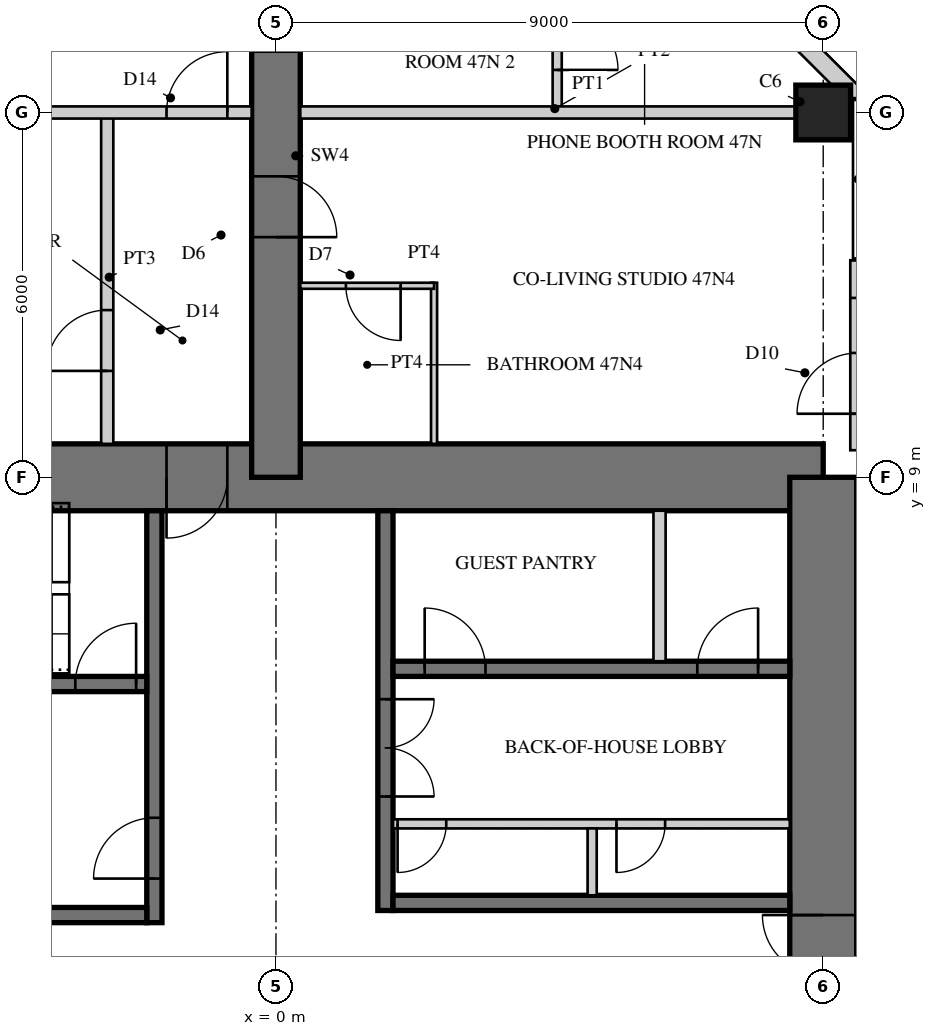
"""IFC4 building model, lengths in metres.
Left out: names, types, materials, properties, quantities, classifications, styles, units other than length and angle.
Written with IfcOpenShell. Run it as: python <this file> out.ifc"""

import sys

from ifc_helpers import new_model, si_unit, direction, frame, frame_2d, origin, origin_2d, place, context, subcontext, project, spatial, rectangle, hollow_rectangle, extrude, element, fill, save


model = new_model("IFC4")
c1 = context("Model", 3, precision=1e-05, world=origin(), true_north=direction((0.0, 1.0)))
c2 = subcontext(c1, "Body", "Model", "MODEL_VIEW")
j1 = project(units=[si_unit("LENGTHUNIT", "METRE"), si_unit("PLANEANGLEUNIT", "RADIAN")], contexts=[c1])
p1 = place(None, origin())
s1 = spatial("IfcSite", under=j1, at=p1, CompositionType="ELEMENT")
p2 = place(p1, origin())
s2 = spatial("IfcBuilding", under=s1, at=p2, CompositionType="ELEMENT")
p3 = place(p2, frame((0.0, 0.0, 189.9)))
s3 = spatial("IfcBuildingStorey", under=s2, at=p3, CompositionType="ELEMENT", Elevation=189.9)
p4 = place(p3, frame((9.0, 9.0, 0.0), z_axis=(0.0, 0.0, 1.0), x_axis=(-1.0, 0.0, 0.0)))
e1 = element("IfcWall", 1, at=p4, inside=s3, PredefinedType="SHEAR", context=c2, shape_type="SweptSolid", body=[
    extrude(rectangle(XDim=18.0, YDim=1.1, at=frame_2d((9.0, 0.0))), origin(), (0.0, 0.0, 1.0), 3.4),
])
p5 = place(p4, frame((9.8, 0.0, 0.0)))
e2 = element("IfcOpeningElement", 2, at=p5, cuts=e1, PredefinedType="OPENING", context=c2, shape_type="SweptSolid", body=[
    extrude(rectangle(XDim=1.0, YDim=2.4, at=frame_2d((0.5, 1.2))), frame((0.0, 0.56, 0.0), z_axis=(0.0, -1.0, 0.0), x_axis=(1.0, 0.0, 0.0)), (0.0, 0.0, 1.0), 1.12),
])
p6 = place(p3, frame((9.0, -9.0, 0.0), z_axis=(0.0, 0.0, 1.0), x_axis=(0.0, 1.0, 0.0)))
e3 = element("IfcWall", 3, at=p6, inside=s3, PredefinedType="SHEAR", context=c2, shape_type="SweptSolid", body=[
    extrude(rectangle(XDim=18.0, YDim=1.1, at=frame_2d((9.0, 0.0))), origin(), (0.0, 0.0, 1.0), 3.4),
])
p7 = place(p6, frame((9.8, 0.0, 0.0)))
e4 = element("IfcOpeningElement", 4, at=p7, cuts=e3, PredefinedType="OPENING", context=c2, shape_type="SweptSolid", body=[
    extrude(rectangle(XDim=1.0, YDim=2.4, at=frame_2d((0.5, 1.2))), frame((0.0, 0.56, 0.0), z_axis=(0.0, -1.0, 0.0), x_axis=(1.0, 0.0, 0.0)), (0.0, 0.0, 1.0), 1.12),
])
p8 = place(p3, frame((1.8, 1.875, 0.0), z_axis=(0.0, 0.0, 1.0), x_axis=(0.0, 1.0, 0.0)))
e5 = element("IfcWall", 5, at=p8, inside=s3, PredefinedType="SHEAR", context=c2, shape_type="SweptSolid", body=[
    extrude(rectangle(XDim=6.575, YDim=0.25, at=frame_2d((3.288, 0.0))), origin(), (0.0, 0.0, 1.0), 3.4),
])
p9 = place(p8, frame((1.875, 0.0, 0.0)))
e6 = element("IfcOpeningElement", 6, at=p9, cuts=e5, PredefinedType="OPENING", context=c2, shape_type="SweptSolid", body=[
    extrude(rectangle(XDim=1.6, YDim=2.4, at=frame_2d((0.8, 1.2))), frame((0.0, 0.135, 0.0), z_axis=(0.0, -1.0, 0.0), x_axis=(1.0, 0.0, 0.0)), (0.0, 0.0, 1.0), 0.27),
])
p10 = place(p3, frame((1.925, 2.0, 0.0), z_axis=(0.0, 0.0, 1.0), x_axis=(1.0, 0.0, 0.0)))
e7 = element("IfcWall", 7, at=p10, inside=s3, PredefinedType="SHEAR", context=c2, shape_type="SweptSolid", body=[
    extrude(rectangle(XDim=6.525, YDim=0.25, at=frame_2d((3.262, 0.0))), origin(), (0.0, 0.0, 1.0), 3.4),
])
p11 = place(p3, frame((1.925, 5.85, 0.0), z_axis=(0.0, 0.0, 1.0), x_axis=(1.0, 0.0, 0.0)))
e8 = element("IfcWall", 8, at=p11, inside=s3, PredefinedType="SHEAR", context=c2, shape_type="SweptSolid", body=[
    extrude(rectangle(XDim=6.525, YDim=0.25, at=frame_2d((3.262, 0.0))), origin(), (0.0, 0.0, 1.0), 3.4),
])
p12 = place(p11, frame((0.521, 0.0, 0.0)))
e9 = element("IfcOpeningElement", 9, at=p12, cuts=e8, PredefinedType="OPENING", context=c2, shape_type="SweptSolid", body=[
    extrude(rectangle(XDim=1.0, YDim=2.1, at=frame_2d((0.5, 1.05))), frame((0.0, 0.135, 0.0), z_axis=(0.0, -1.0, 0.0), x_axis=(1.0, 0.0, 0.0)), (0.0, 0.0, 1.0), 0.27),
])
p13 = place(p11, frame((5.004, 0.0, 0.0)))
e10 = element("IfcOpeningElement", 10, at=p13, cuts=e8, PredefinedType="OPENING", context=c2, shape_type="SweptSolid", body=[
    extrude(rectangle(XDim=1.0, YDim=2.1, at=frame_2d((0.5, 1.05))), frame((0.0, 0.135, 0.0), z_axis=(0.0, -1.0, 0.0), x_axis=(1.0, 0.0, 0.0)), (0.0, 0.0, 1.0), 0.27),
])
p14 = place(p3, frame((1.925, 3.3, 0.0), z_axis=(0.0, 0.0, 1.0), x_axis=(1.0, 0.0, 0.0)))
e11 = element("IfcWall", 11, at=p14, inside=s3, PredefinedType="PARTITIONING", context=c2, shape_type="SweptSolid", body=[
    extrude(rectangle(XDim=6.525, YDim=0.15, at=frame_2d((3.262, 0.0))), origin(), (0.0, 0.0, 1.0), 3.4),
])
p15 = place(p14, frame((0.075, 0.0, 0.0)))
e12 = element("IfcOpeningElement", 12, at=p15, cuts=e11, PredefinedType="OPENING", context=c2, shape_type="SweptSolid", body=[
    extrude(rectangle(XDim=0.8, YDim=2.1, at=frame_2d((0.4, 1.05))), frame((0.0, 0.085, 0.0), z_axis=(0.0, -1.0, 0.0), x_axis=(1.0, 0.0, 0.0)), (0.0, 0.0, 1.0), 0.17),
])
p16 = place(p14, frame((3.675, 0.0, 0.0)))
e13 = element("IfcOpeningElement", 13, at=p16, cuts=e11, PredefinedType="OPENING", context=c2, shape_type="SweptSolid", body=[
    extrude(rectangle(XDim=0.8, YDim=2.1, at=frame_2d((0.4, 1.05))), frame((0.0, 0.085, 0.0), z_axis=(0.0, -1.0, 0.0), x_axis=(1.0, 0.0, 0.0)), (0.0, 0.0, 1.0), 0.17),
])
p17 = place(p3, frame((5.2, 2.125, 0.0), z_axis=(0.0, 0.0, 1.0), x_axis=(0.0, 1.0, 0.0)))
e14 = element("IfcWall", 14, at=p17, inside=s3, PredefinedType="PARTITIONING", context=c2, shape_type="SweptSolid", body=[
    extrude(rectangle(XDim=1.1, YDim=0.15, at=frame_2d((0.55, 0.0))), origin(), (0.0, 0.0, 1.0), 3.4),
])
p18 = place(p3, frame((6.308, 5.975, 0.0), z_axis=(0.0, 0.0, 1.0), x_axis=(0.0, 1.0, 0.0)))
e15 = element("IfcWall", 15, at=p18, inside=s3, PredefinedType="PARTITIONING", context=c2, shape_type="SweptSolid", body=[
    extrude(rectangle(XDim=2.475, YDim=0.2, at=frame_2d((1.237, 0.0))), origin(), (0.0, 0.0, 1.0), 3.4),
])
p19 = place(p3, frame((-2.0, 1.675, 0.0), z_axis=(0.0, 0.0, 1.0), x_axis=(0.0, 1.0, 0.0)))
e16 = element("IfcWall", 16, at=p19, inside=s3, PredefinedType="SHEAR", context=c2, shape_type="SweptSolid", body=[
    extrude(rectangle(XDim=6.775, YDim=0.25, at=frame_2d((3.387, 0.0))), origin(), (0.0, 0.0, 1.0), 3.4),
])
p20 = place(p19, frame((0.725, 0.0, 0.0)))
e17 = element("IfcOpeningElement", 17, at=p20, cuts=e16, PredefinedType="OPENING", context=c2, shape_type="SweptSolid", body=[
    extrude(rectangle(XDim=1.0, YDim=2.1, at=frame_2d((0.5, 1.05))), frame((0.0, 0.135, 0.0), z_axis=(0.0, -1.0, 0.0), x_axis=(1.0, 0.0, 0.0)), (0.0, 0.0, 1.0), 0.27),
])
p21 = place(p3, frame((-2.125, 1.8, 0.0), z_axis=(0.0, 0.0, 1.0), x_axis=(-1.0, 0.0, 0.0)))
e18 = element("IfcWall", 18, at=p21, inside=s3, PredefinedType="SHEAR", context=c2, shape_type="SweptSolid", body=[
    extrude(rectangle(XDim=6.325, YDim=0.25, at=frame_2d((3.163, 0.0))), origin(), (0.0, 0.0, 1.0), 3.4),
])
p22 = place(p3, frame((-2.125, 5.6, 0.0), z_axis=(0.0, 0.0, 1.0), x_axis=(-1.0, 0.0, 0.0)))
e19 = element("IfcWall", 19, at=p22, inside=s3, PredefinedType="SHEAR", context=c2, shape_type="SweptSolid", body=[
    extrude(rectangle(XDim=6.325, YDim=0.25, at=frame_2d((3.163, 0.0))), origin(), (0.0, 0.0, 1.0), 3.4),
])
p23 = place(p22, frame((0.175, 0.0, 0.0)))
e20 = element("IfcOpeningElement", 20, at=p23, cuts=e19, PredefinedType="OPENING", context=c2, shape_type="SweptSolid", body=[
    extrude(rectangle(XDim=1.0, YDim=2.1, at=frame_2d((0.5, 1.05))), frame((0.0, 0.135, 0.0), z_axis=(0.0, -1.0, 0.0), x_axis=(1.0, 0.0, 0.0)), (0.0, 0.0, 1.0), 0.27),
])
p24 = place(p3, frame((0.0, 9.0, 0.0), z_axis=(0.0, 0.0, 1.0), x_axis=(0.0, 1.0, 0.0)))
e21 = element("IfcWall", 21, at=p24, inside=s3, PredefinedType="SHEAR", context=c2, shape_type="SweptSolid", body=[
    extrude(rectangle(XDim=9.0, YDim=0.8, at=frame_2d((4.5, 0.0))), origin(), (0.0, 0.0, 1.0), 3.4),
])
p25 = place(p24, frame((3.95, 0.0, 0.0)))
e22 = element("IfcOpeningElement", 22, at=p25, cuts=e21, PredefinedType="OPENING", context=c2, shape_type="SweptSolid", body=[
    extrude(rectangle(XDim=1.0, YDim=2.15, at=frame_2d((0.5, 1.075))), frame((0.0, 0.41, 0.0), z_axis=(0.0, -1.0, 0.0), x_axis=(1.0, 0.0, 0.0)), (0.0, 0.0, 1.0), 0.82),
])
p26 = place(p24, frame((7.0, 0.0, 0.0)))
e23 = element("IfcOpeningElement", 23, at=p26, cuts=e21, PredefinedType="OPENING", context=c2, shape_type="SweptSolid", body=[
    extrude(rectangle(XDim=1.0, YDim=2.2, at=frame_2d((0.5, 1.1))), frame((0.0, 0.41, 0.0), z_axis=(0.0, -1.0, 0.0), x_axis=(1.0, 0.0, 0.0)), (0.0, 0.0, 1.0), 0.82),
])
p27 = place(p3, frame((9.0, 15.0, 0.0), z_axis=(0.0, 0.0, 1.0), x_axis=(1.0, 0.0, 0.0)))
e24 = element("IfcColumn", 24, at=p27, inside=s3, PredefinedType="COLUMN", context=c2, shape_type="SweptSolid", body=[
    extrude(rectangle(XDim=0.9, YDim=0.9, at=origin_2d()), origin(), (0.0, 0.0, 1.0), 3.4),
])
p28 = place(p3, frame((9.57, 9.445, 0.0), z_axis=(0.0, 0.0, 1.0), x_axis=(0.0, 1.0, 0.0)))
e25 = element("IfcWall", 25, at=p28, inside=s3, PredefinedType="SOLIDWALL", context=c2, shape_type="SweptSolid", body=[
    extrude(rectangle(XDim=3.125, YDim=0.25, at=frame_2d((1.562, 0.0))), origin(), (0.0, 0.0, 1.0), 3.22),
])
p29 = place(p28, frame((0.6, 0.0, 0.0)))
e26 = element("IfcOpeningElement", 26, at=p29, cuts=e25, PredefinedType="OPENING", context=c2, shape_type="SweptSolid", body=[
    extrude(rectangle(XDim=1.0, YDim=2.2, at=frame_2d((0.5, 1.1))), frame((0.0, 0.135, 0.0), z_axis=(0.0, -1.0, 0.0), x_axis=(1.0, 0.0, 0.0)), (0.0, 0.0, 1.0), 0.27),
])
p30 = place(p3, frame((9.57, 15.236, 0.0), z_axis=(0.0, 0.0, 1.0), x_axis=(-0.707134062067, 0.707079499254, 0.0)))
e27 = element("IfcWall", 27, at=p30, inside=s3, PredefinedType="SOLIDWALL", context=c2, shape_type="SweptSolid", body=[
    extrude(rectangle(XDim=4.475, YDim=0.3, at=frame_2d((2.237, 0.0))), origin(), (0.0, 0.0, 1.0), 3.22),
])
p31 = place(p30, frame((1.787, 0.0, 0.3)))
e28 = element("IfcOpeningElement", 28, at=p31, cuts=e27, PredefinedType="OPENING", context=c2, shape_type="SweptSolid", body=[
    extrude(rectangle(XDim=0.9, YDim=2.4, at=frame_2d((0.45, 1.2))), frame((0.0, 0.16, 0.0), z_axis=(0.0, -1.0, 0.0), x_axis=(1.0, 0.0, 0.0)), (0.0, 0.0, 1.0), 0.32),
])
p32 = place(p3, frame((2.6, 9.55, 0.0), z_axis=(0.0, 0.0, 1.0), x_axis=(0.0, 1.0, 0.0)))
e29 = element("IfcWall", 29, at=p32, inside=s3, PredefinedType="PARTITIONING", context=c2, shape_type="SweptSolid", body=[
    extrude(rectangle(XDim=2.65, YDim=0.1, at=frame_2d((1.325, 0.0))), origin(), (0.0, 0.0, 1.0), 3.22),
])
p33 = place(p3, frame((2.6, 12.15, 0.0), z_axis=(0.0, 0.0, 1.0), x_axis=(-1.0, 0.0, 0.0)))
e30 = element("IfcWall", 30, at=p33, inside=s3, PredefinedType="PARTITIONING", context=c2, shape_type="SweptSolid", body=[
    extrude(rectangle(XDim=2.2, YDim=0.1, at=frame_2d((1.1, 0.0))), origin(), (0.0, 0.0, 1.0), 3.22),
])
p34 = place(p33, frame((0.55, 0.0, 0.0)))
e31 = element("IfcOpeningElement", 31, at=p34, cuts=e30, PredefinedType="OPENING", context=c2, shape_type="SweptSolid", body=[
    extrude(rectangle(XDim=0.9, YDim=2.1, at=frame_2d((0.45, 1.05))), frame((0.0, 0.06, 0.0), z_axis=(0.0, -1.0, 0.0), x_axis=(1.0, 0.0, 0.0)), (0.0, 0.0, 1.0), 0.12),
])
p35 = place(p3, frame((-2.775, 9.55, 0.0), z_axis=(0.0, 0.0, 1.0), x_axis=(0.0, 1.0, 0.0)))
e32 = element("IfcWall", 32, at=p35, inside=s3, PredefinedType="SOLIDWALL", context=c2, shape_type="SweptSolid", body=[
    extrude(rectangle(XDim=5.45, YDim=0.2, at=frame_2d((2.725, 0.0))), origin(), (0.0, 0.0, 1.0), 3.22),
])
p36 = place(p35, frame((1.2, 0.0, 0.0)))
e33 = element("IfcOpeningElement", 33, at=p36, cuts=e32, PredefinedType="OPENING", context=c2, shape_type="SweptSolid", body=[
    extrude(rectangle(XDim=1.0, YDim=2.2, at=frame_2d((0.5, 1.1))), frame((0.0, 0.11, 0.0), z_axis=(0.0, -1.0, 0.0), x_axis=(1.0, 0.0, 0.0)), (0.0, 0.0, 1.0), 0.22),
])
p37 = place(p3, frame((4.625, 15.1, 0.0), z_axis=(0.0, 0.0, 1.0), x_axis=(0.0, 1.0, 0.0)))
e34 = element("IfcWall", 34, at=p37, inside=s3, PredefinedType="PARTITIONING", context=c2, shape_type="SweptSolid", body=[
    extrude(rectangle(XDim=2.5, YDim=0.15, at=frame_2d((1.25, 0.0))), origin(), (0.0, 0.0, 1.0), 3.22),
])
p38 = place(p37, frame((0.6, 0.0, 0.0)))
e35 = element("IfcOpeningElement", 35, at=p38, cuts=e34, PredefinedType="OPENING", context=c2, shape_type="SweptSolid", body=[
    extrude(rectangle(XDim=1.0, YDim=2.1, at=frame_2d((0.5, 1.05))), frame((0.0, 0.085, 0.0), z_axis=(0.0, -1.0, 0.0), x_axis=(1.0, 0.0, 0.0)), (0.0, 0.0, 1.0), 0.17),
])
p39 = place(p3, frame((8.55, 15.0, 0.0), z_axis=(0.0, 0.0, 1.0), x_axis=(-1.0, 0.0, 0.0)))
e36 = element("IfcWall", 36, at=p39, inside=s3, PredefinedType="SOLIDWALL", context=c2, shape_type="SweptSolid", body=[
    extrude(rectangle(XDim=8.15, YDim=0.2, at=frame_2d((4.075, 0.0))), origin(), (0.0, 0.0, 1.0), 2.47),
])
p40 = place(p3, frame((-0.4, 15.0, 0.0), z_axis=(0.0, 0.0, 1.0), x_axis=(-1.0, 0.0, 0.0)))
e37 = element("IfcWall", 37, at=p40, inside=s3, PredefinedType="SOLIDWALL", context=c2, shape_type="SweptSolid", body=[
    extrude(rectangle(XDim=8.15, YDim=0.2, at=frame_2d((4.075, 0.0))), origin(), (0.0, 0.0, 1.0), 2.47),
])
p41 = place(p40, frame((0.4, 0.0, 0.0)))
e38 = element("IfcOpeningElement", 38, at=p41, cuts=e37, PredefinedType="OPENING", context=c2, shape_type="SweptSolid", body=[
    extrude(rectangle(XDim=1.0, YDim=2.2, at=frame_2d((0.5, 1.1))), frame((0.0, 0.11, 0.0), z_axis=(0.0, -1.0, 0.0), x_axis=(1.0, 0.0, 0.0)), (0.0, 0.0, 1.0), 0.22),
])
p42 = place(p29, origin())
e39 = element("IfcDoor", 39, at=p42, inside=s3, OperationType="SINGLE_SWING_LEFT", PredefinedType="DOOR", context=c2, shape_type="SweptSolid", body=[
    extrude(hollow_rectangle(XDim=1.0, YDim=2.2, WallThickness=0.06, at=frame_2d((0.5, 1.1))), frame((0.0, 0.025, 0.0), z_axis=(0.0, -1.0, 0.0), x_axis=(1.0, 0.0, 0.0)), (0.0, 0.0, 1.0), 0.05),
    extrude(rectangle(XDim=0.879, YDim=2.079, at=frame_2d((0.5, 1.1))), frame((0.0, 0.025, 0.0), z_axis=(0.0, -1.0, 0.0), x_axis=(1.0, 0.0, 0.0)), (0.0, 0.0, 1.0), 0.05),
])
fill(e26, e39)
p43 = place(p34, origin())
e40 = element("IfcDoor", 40, at=p43, inside=s3, OperationType="SINGLE_SWING_LEFT", PredefinedType="DOOR", context=c2, shape_type="SweptSolid", body=[
    extrude(rectangle(XDim=0.9, YDim=2.1, at=frame_2d((0.45, 1.05))), frame((0.0, 0.025, 0.0), z_axis=(0.0, -1.0, 0.0), x_axis=(1.0, 0.0, 0.0)), (0.0, 0.0, 1.0), 0.05),
])
fill(e31, e40)
p44 = place(p36, origin())
e41 = element("IfcDoor", 41, at=p44, inside=s3, OperationType="SINGLE_SWING_LEFT", PredefinedType="DOOR", context=c2, shape_type="SweptSolid", body=[
    extrude(rectangle(XDim=1.0, YDim=2.2, at=frame_2d((0.5, 1.1))), frame((0.0, 0.025, 0.0), z_axis=(0.0, -1.0, 0.0), x_axis=(1.0, 0.0, 0.0)), (0.0, 0.0, 1.0), 0.05),
])
fill(e33, e41)
p45 = place(p38, frame((1.0, 0.0, 0.0), z_axis=(0.0, 0.0, 1.0), x_axis=(-1.0, 0.0, 0.0)))
e42 = element("IfcDoor", 42, at=p45, inside=s3, OperationType="SINGLE_SWING_RIGHT", PredefinedType="DOOR", context=c2, shape_type="SweptSolid", body=[
    extrude(rectangle(XDim=1.0, YDim=2.1, at=frame_2d((0.5, 1.05))), frame((0.0, 0.025, 0.0), z_axis=(0.0, -1.0, 0.0), x_axis=(1.0, 0.0, 0.0)), (0.0, 0.0, 1.0), 0.05),
])
fill(e35, e42)
p46 = place(p41, frame((1.0, 0.0, 0.0), z_axis=(0.0, 0.0, 1.0), x_axis=(-1.0, 0.0, 0.0)))
e43 = element("IfcDoor", 43, at=p46, inside=s3, OperationType="SINGLE_SWING_RIGHT", PredefinedType="DOOR", context=c2, shape_type="SweptSolid", body=[
    extrude(rectangle(XDim=1.0, YDim=2.2, at=frame_2d((0.5, 1.1))), frame((0.0, 0.025, 0.0), z_axis=(0.0, -1.0, 0.0), x_axis=(1.0, 0.0, 0.0)), (0.0, 0.0, 1.0), 0.05),
])
fill(e38, e43)
p47 = place(p25, frame((1.0, 0.0, 0.0), z_axis=(0.0, 0.0, 1.0), x_axis=(-1.0, 0.0, 0.0)))
e44 = element("IfcDoor", 44, at=p47, inside=s3, OperationType="SINGLE_SWING_RIGHT", PredefinedType="DOOR", context=c2, shape_type="SweptSolid", body=[
    extrude(rectangle(XDim=1.0, YDim=2.15, at=frame_2d((0.5, 1.075))), frame((0.0, 0.025, 0.0), z_axis=(0.0, -1.0, 0.0), x_axis=(1.0, 0.0, 0.0)), (0.0, 0.0, 1.0), 0.05),
])
fill(e22, e44)
p48 = place(p5, origin())
e45 = element("IfcDoor", 45, at=p48, inside=s3, OperationType="SINGLE_SWING_RIGHT", PredefinedType="DOOR", context=c2, shape_type="SweptSolid", body=[
    extrude(rectangle(XDim=1.0, YDim=2.4, at=frame_2d((0.5, 1.2))), frame((0.0, 0.055, 0.0), z_axis=(0.0, -1.0, 0.0), x_axis=(1.0, 0.0, 0.0)), (0.0, 0.0, 1.0), 0.05),
])
fill(e2, e45)
p49 = place(p7, origin())
e46 = element("IfcDoor", 46, at=p49, inside=s3, OperationType="SINGLE_SWING_RIGHT", PredefinedType="DOOR", context=c2, shape_type="SweptSolid", body=[
    extrude(rectangle(XDim=1.0, YDim=2.4, at=frame_2d((0.5, 1.2))), frame((0.0, 0.055, 0.0), z_axis=(0.0, -1.0, 0.0), x_axis=(1.0, 0.0, 0.0)), (0.0, 0.0, 1.0), 0.05),
])
fill(e4, e46)
p50 = place(p9, frame((1.6, 0.0, 0.0), z_axis=(0.0, 0.0, 1.0), x_axis=(-1.0, 0.0, 0.0)))
e47 = element("IfcDoor", 47, at=p50, inside=s3, OperationType="DOUBLE_DOOR_SINGLE_SWING", PredefinedType="DOOR", context=c2, shape_type="SweptSolid", body=[
    extrude(rectangle(XDim=1.6, YDim=2.4, at=frame_2d((0.8, 1.2))), frame((0.0, 0.025, 0.0), z_axis=(0.0, -1.0, 0.0), x_axis=(1.0, 0.0, 0.0)), (0.0, 0.0, 1.0), 0.05),
])
fill(e6, e47)
p51 = place(p15, frame((0.8, 0.0, 0.0), z_axis=(0.0, 0.0, 1.0), x_axis=(-1.0, 0.0, 0.0)))
e48 = element("IfcDoor", 48, at=p51, inside=s3, OperationType="SINGLE_SWING_RIGHT", PredefinedType="DOOR", context=c2, shape_type="SweptSolid", body=[
    extrude(rectangle(XDim=0.8, YDim=2.1, at=frame_2d((0.4, 1.05))), frame((0.0, 0.025, 0.0), z_axis=(0.0, -1.0, 0.0), x_axis=(1.0, 0.0, 0.0)), (0.0, 0.0, 1.0), 0.05),
])
fill(e12, e48)
p52 = place(p16, frame((0.8, 0.0, 0.0), z_axis=(0.0, 0.0, 1.0), x_axis=(-1.0, 0.0, 0.0)))
e49 = element("IfcDoor", 49, at=p52, inside=s3, OperationType="SINGLE_SWING_RIGHT", PredefinedType="DOOR", context=c2, shape_type="SweptSolid", body=[
    extrude(rectangle(XDim=0.8, YDim=2.1, at=frame_2d((0.4, 1.05))), frame((0.0, 0.025, 0.0), z_axis=(0.0, -1.0, 0.0), x_axis=(1.0, 0.0, 0.0)), (0.0, 0.0, 1.0), 0.05),
])
fill(e13, e49)
p53 = place(p20, origin())
e50 = element("IfcDoor", 50, at=p53, inside=s3, OperationType="SINGLE_SWING_LEFT", PredefinedType="DOOR", context=c2, shape_type="SweptSolid", body=[
    extrude(rectangle(XDim=1.0, YDim=2.1, at=frame_2d((0.5, 1.05))), frame((0.0, 0.025, 0.0), z_axis=(0.0, -1.0, 0.0), x_axis=(1.0, 0.0, 0.0)), (0.0, 0.0, 1.0), 0.05),
])
fill(e17, e50)
p54 = place(p23, frame((1.0, 0.0, 0.0), z_axis=(0.0, 0.0, 1.0), x_axis=(-1.0, 0.0, 0.0)))
e51 = element("IfcDoor", 51, at=p54, inside=s3, OperationType="SINGLE_SWING_RIGHT", PredefinedType="DOOR", context=c2, shape_type="SweptSolid", body=[
    extrude(rectangle(XDim=1.0, YDim=2.1, at=frame_2d((0.5, 1.05))), frame((0.0, 0.025, 0.0), z_axis=(0.0, -1.0, 0.0), x_axis=(1.0, 0.0, 0.0)), (0.0, 0.0, 1.0), 0.05),
])
fill(e20, e51)
p55 = place(p12, origin())
e52 = element("IfcDoor", 52, at=p55, inside=s3, OperationType="SINGLE_SWING_LEFT", PredefinedType="DOOR", context=c2, shape_type="SweptSolid", body=[
    extrude(rectangle(XDim=1.0, YDim=2.1, at=frame_2d((0.5, 1.05))), frame((0.0, 0.025, 0.0), z_axis=(0.0, -1.0, 0.0), x_axis=(1.0, 0.0, 0.0)), (0.0, 0.0, 1.0), 0.05),
])
fill(e9, e52)
p56 = place(p13, origin())
e53 = element("IfcDoor", 53, at=p56, inside=s3, OperationType="SINGLE_SWING_RIGHT", PredefinedType="DOOR", context=c2, shape_type="SweptSolid", body=[
    extrude(rectangle(XDim=1.0, YDim=2.1, at=frame_2d((0.5, 1.05))), frame((0.0, 0.025, 0.0), z_axis=(0.0, -1.0, 0.0), x_axis=(1.0, 0.0, 0.0)), (0.0, 0.0, 1.0), 0.05),
])
fill(e10, e53)
save(model, sys.argv[1])
